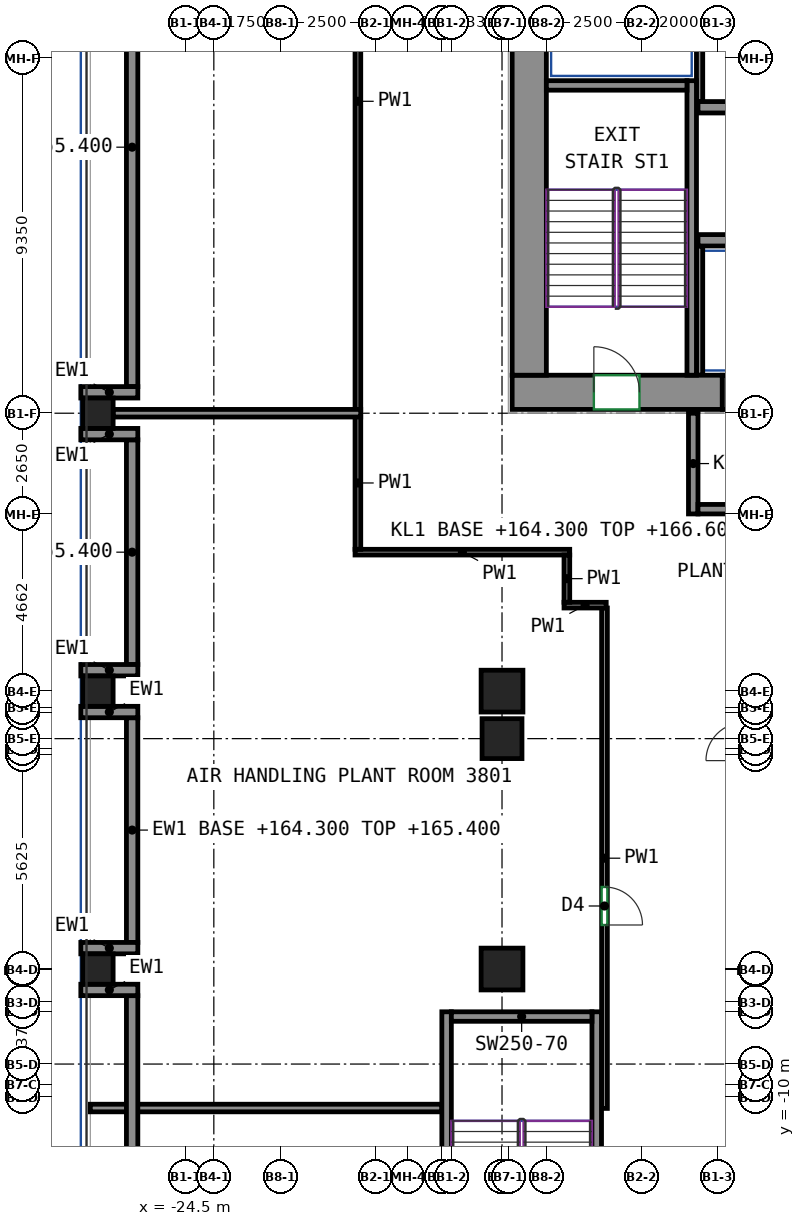
"""IFC4 building model, lengths in metres.
Left out: names, types, materials, properties, quantities, classifications, styles, units other than length and angle.
Written with IfcOpenShell. Run it as: python <this file> out.ifc"""

import sys

from ifc_helpers import new_model, si_unit, direction, frame, frame_2d, origin, origin_2d, place, context, subcontext, project, spatial, rectangle, extrude, source, transform, mapped, element, fill, save


model = new_model("IFC4")
c1 = context("Model", 3, precision=1e-05, world=origin(), true_north=direction((0.0, 1.0)))
c2 = subcontext(c1, "Body", "Model", "MODEL_VIEW")
j1 = project(units=[si_unit("LENGTHUNIT", "METRE"), si_unit("PLANEANGLEUNIT", "RADIAN")], contexts=[c1])
p1 = place(None, origin())
s1 = spatial("IfcSite", under=j1, at=p1, CompositionType="ELEMENT")
p2 = place(p1, origin())
s2 = spatial("IfcBuilding", under=s1, at=p2, CompositionType="ELEMENT")
p3 = place(p2, frame((0.0, 0.0, 164.3)))
s3 = spatial("IfcBuildingStorey", under=s2, at=p3, CompositionType="ELEMENT", Elevation=164.3)
m1 = source(origin(), c2, "Body", "SweptSolid", [
    extrude(rectangle(XDim=0.8, YDim=0.8, at=origin_2d()), origin(), (0.0, 0.0, 1.0), 2.3),
])
for number, where, z_axis, x_axis in (
    (1, (-26.8, -6.625, 0.0), (0.0, 0.0, 1.0), (1.0, 0.0, 0.0)),
    (2, (-26.8, 0.688, 0.0), (0.0, 0.0, 1.0), (1.0, 0.0, 0.0)),
    (3, (-26.8, 8.0, 0.0), (0.0, 0.0, 1.0), (1.0, 0.0, 0.0)),
):
    element("IfcColumn", number, at=place(p3, frame(where, z_axis=z_axis, x_axis=x_axis)), inside=s3, PredefinedType="COLUMN", context=c2, shape_type="MappedRepresentation", body=[
        mapped(m1, transform((0.0, 0.0, 0.0))),
    ])
m2 = source(origin(), c2, "Body", "SweptSolid", [
    extrude(rectangle(XDim=1.1, YDim=1.1, at=origin_2d()), origin(), (0.0, 0.0, 1.0), 2.3),
])
for number, where, z_axis, x_axis in (
    (4, (-16.167, -6.625, 0.0), (0.0, 0.0, 1.0), (1.0, 0.0, 0.0)),
    (5, (-16.167, 0.688, 0.0), (0.0, 0.0, 1.0), (1.0, 0.0, 0.0)),
):
    element("IfcColumn", number, at=place(p3, frame(where, z_axis=z_axis, x_axis=x_axis)), inside=s3, PredefinedType="COLUMN", context=c2, shape_type="MappedRepresentation", body=[
        mapped(m2, transform((0.0, 0.0, 0.0))),
    ])
m3 = source(origin(), c2, "Body", "SweptSolid", [
    extrude(rectangle(XDim=1.05, YDim=1.05, at=origin_2d()), origin(), (0.0, 0.0, 1.0), 3.8),
])
p4 = place(p3, frame((-16.167, -0.562, 0.0), z_axis=(0.0, 0.0, 1.0), x_axis=(1.0, 0.0, 0.0)))
e6 = element("IfcColumn", 6, at=p4, inside=s3, PredefinedType="COLUMN", context=c2, shape_type="MappedRepresentation", body=[
    mapped(m3, transform((0.0, 0.0, 0.0))),
])
m4 = source(origin(), c2, "Body", "SweptSolid", [
    extrude(rectangle(XDim=5.53, YDim=0.9, at=frame_2d((2.765, 0.0))), origin(), (0.0, 0.0, 1.0), 3.8),
])
p5 = place(p3, frame((-15.9, 8.55, 0.0), z_axis=(0.0, 0.0, 1.0), x_axis=(1.0, 0.0, 0.0)))
e7 = element("IfcWall", 7, at=p5, inside=s3, PredefinedType="SHEAR", context=c2, shape_type="MappedRepresentation", body=[
    mapped(m4, transform((0.0, 0.0, 0.0))),
])
p6 = place(p5, frame((2.15, 0.0, 0.0)))
e8 = element("IfcOpeningElement", 8, at=p6, cuts=e7, PredefinedType="OPENING", context=c2, shape_type="SweptSolid", body=[
    extrude(rectangle(XDim=1.2, YDim=2.1, at=frame_2d((0.6, 1.05))), frame((0.0, 0.46, 0.0), z_axis=(0.0, -1.0, 0.0), x_axis=(1.0, 0.0, 0.0)), (0.0, 0.0, 1.0), 0.92),
])
m5 = source(origin(), c2, "Body", "SweptSolid", [
    extrude(rectangle(XDim=12.0, YDim=0.9, at=frame_2d((6.0, 0.0))), origin(), (0.0, 0.0, 1.0), 3.8),
])
p7 = place(p3, frame((-15.45, 9.0, 0.0), z_axis=(0.0, 0.0, 1.0), x_axis=(0.0, 1.0, 0.0)))
e9 = element("IfcWall", 9, at=p7, inside=s3, PredefinedType="SHEAR", context=c2, shape_type="MappedRepresentation", body=[
    mapped(m5, transform((0.0, 0.0, 0.0))),
])
m6 = source(origin(), c2, "Body", "SweptSolid", [
    extrude(rectangle(XDim=7.75, YDim=0.25, at=frame_2d((3.875, 0.0))), origin(), (0.0, 0.0, 1.0), 3.8),
])
p8 = place(p3, frame((-11.175, 9.0, 0.0), z_axis=(0.0, 0.0, 1.0), x_axis=(0.0, 1.0, 0.0)))
e10 = element("IfcWall", 10, at=p8, inside=s3, PredefinedType="SHEAR", context=c2, shape_type="MappedRepresentation", body=[
    mapped(m6, transform((0.0, 0.0, 0.0))),
])
m7 = source(origin(), c2, "Body", "SweptSolid", [
    extrude(rectangle(XDim=3.7, YDim=0.25, at=frame_2d((1.85, 0.0))), origin(), (0.0, 0.0, 1.0), 3.8),
])
p9 = place(p3, frame((-15.0, 16.625, 0.0), z_axis=(0.0, 0.0, 1.0), x_axis=(1.0, 0.0, 0.0)))
e11 = element("IfcWall", 11, at=p9, inside=s3, PredefinedType="SHEAR", context=c2, shape_type="MappedRepresentation", body=[
    mapped(m7, transform((0.0, 0.0, 0.0))),
])
m8 = source(origin(), c2, "Body", "SweptSolid", [
    extrude(rectangle(XDim=8.0, YDim=0.25, at=frame_2d((4.0, 0.0))), origin(), (0.0, 0.0, 1.0), 3.8),
])
for number, where, z_axis, x_axis in (
    (12, (-17.625, -15.75, 0.0), (0.0, 0.0, 1.0), (0.0, 1.0, 0.0)),
    (13, (-13.675, -15.75, 0.0), (0.0, 0.0, 1.0), (0.0, 1.0, 0.0)),
):
    element("IfcWall", number, at=place(p3, frame(where, z_axis=z_axis, x_axis=x_axis)), inside=s3, PredefinedType="SHEAR", context=c2, shape_type="MappedRepresentation", body=[
        mapped(m8, transform((0.0, 0.0, 0.0))),
    ])
p10 = place(p3, frame((-17.5, -7.875, 0.0), z_axis=(0.0, 0.0, 1.0), x_axis=(1.0, 0.0, 0.0)))
e14 = element("IfcWall", 14, at=p10, inside=s3, PredefinedType="SHEAR", context=c2, shape_type="MappedRepresentation", body=[
    mapped(m7, transform((0.0, 0.0, 0.0))),
])
m9 = source(origin(), c2, "Body", "SweptSolid", [
    extrude(rectangle(XDim=6.0, YDim=0.3, at=frame_2d((3.0, 0.0))), origin(), (0.0, 0.0, 1.0), 3.8),
])
p11 = place(p3, frame((-11.01, 12.55, 0.0), z_axis=(0.0, 0.0, 1.0), x_axis=(1.0, 0.0, 0.0)))
e15 = element("IfcWall", 15, at=p11, inside=s3, PredefinedType="SHEAR", context=c2, shape_type="MappedRepresentation", body=[
    mapped(m9, transform((0.0, 0.0, 0.0))),
])
m10 = source(origin(), c2, "Body", "SweptSolid", [
    extrude(rectangle(XDim=14.04, YDim=0.3, at=frame_2d((7.02, 0.0))), origin(), (0.0, 0.0, 1.0), 3.8),
])
p12 = place(p3, frame((-11.01, 16.05, 0.0), z_axis=(0.0, 0.0, 1.0), x_axis=(1.0, 0.0, 0.0)))
e16 = element("IfcWall", 16, at=p12, inside=s3, PredefinedType="SHEAR", context=c2, shape_type="MappedRepresentation", body=[
    mapped(m10, transform((0.0, 0.0, 0.0))),
])
m11 = source(origin(), c2, "Body", "SweptSolid", [
    extrude(rectangle(XDim=12.6, YDim=0.3, at=frame_2d((6.3, 0.0))), origin(), (0.0, 0.0, 1.0), 1.1),
])
p13 = place(p3, frame((-25.9, 21.3, 0.0), z_axis=(0.0, 0.0, 1.0), x_axis=(0.0, -1.0, 0.0)))
e17 = element("IfcWall", 17, at=p13, inside=s3, PredefinedType="SOLIDWALL", context=c2, shape_type="MappedRepresentation", body=[
    mapped(m11, transform((0.0, 0.0, 0.0))),
])
m12 = source(origin(), c2, "Body", "SweptSolid", [
    extrude(rectangle(XDim=1.5, YDim=0.3, at=frame_2d((0.75, 0.0))), origin(), (0.0, 0.0, 1.0), 2.3),
])
p14 = place(p3, frame((-27.25, 8.55, 0.0), z_axis=(0.0, 0.0, 1.0), x_axis=(1.0, 0.0, 0.0)))
e18 = element("IfcWall", 18, at=p14, inside=s3, PredefinedType="SOLIDWALL", context=c2, shape_type="MappedRepresentation", body=[
    mapped(m12, transform((0.0, 0.0, 0.0))),
])
m13 = source(origin(), c2, "Body", "SweptSolid", [
    extrude(rectangle(XDim=5.913, YDim=0.3, at=frame_2d((2.956, 0.0))), origin(), (0.0, 0.0, 1.0), 1.1),
])
p15 = place(p3, frame((-25.9, 7.3, 0.0), z_axis=(0.0, 0.0, 1.0), x_axis=(0.0, -1.0, 0.0)))
e19 = element("IfcWall", 19, at=p15, inside=s3, PredefinedType="SOLIDWALL", context=c2, shape_type="MappedRepresentation", body=[
    mapped(m13, transform((0.0, 0.0, 0.0))),
])
for number, where, z_axis, x_axis in (
    (20, (-27.25, 7.45, 0.0), (0.0, 0.0, 1.0), (1.0, 0.0, 0.0)),
    (21, (-27.25, 1.238, 0.0), (0.0, 0.0, 1.0), (1.0, 0.0, 0.0)),
):
    element("IfcWall", number, at=place(p3, frame(where, z_axis=z_axis, x_axis=x_axis)), inside=s3, PredefinedType="SOLIDWALL", context=c2, shape_type="MappedRepresentation", body=[
        mapped(m12, transform((0.0, 0.0, 0.0))),
    ])
p16 = place(p3, frame((-25.9, -0.012, 0.0), z_axis=(0.0, 0.0, 1.0), x_axis=(0.0, -1.0, 0.0)))
e22 = element("IfcWall", 22, at=p16, inside=s3, PredefinedType="SOLIDWALL", context=c2, shape_type="MappedRepresentation", body=[
    mapped(m13, transform((0.0, 0.0, 0.0))),
])
for number, where, z_axis, x_axis in (
    (23, (-27.25, 0.137, 0.0), (0.0, 0.0, 1.0), (1.0, 0.0, 0.0)),
    (24, (-27.25, -6.075, 0.0), (0.0, 0.0, 1.0), (1.0, 0.0, 0.0)),
):
    element("IfcWall", number, at=place(p3, frame(where, z_axis=z_axis, x_axis=x_axis)), inside=s3, PredefinedType="SOLIDWALL", context=c2, shape_type="MappedRepresentation", body=[
        mapped(m12, transform((0.0, 0.0, 0.0))),
    ])
m14 = source(origin(), c2, "Body", "SweptSolid", [
    extrude(rectangle(XDim=9.725, YDim=0.3, at=frame_2d((4.863, 0.0))), origin(), (0.0, 0.0, 1.0), 1.1),
])
p17 = place(p3, frame((-25.9, -7.325, 0.0), z_axis=(0.0, 0.0, 1.0), x_axis=(0.0, -1.0, 0.0)))
e25 = element("IfcWall", 25, at=p17, inside=s3, PredefinedType="SOLIDWALL", context=c2, shape_type="MappedRepresentation", body=[
    mapped(m14, transform((0.0, 0.0, 0.0))),
])
p18 = place(p3, frame((-27.25, -7.175, 0.0), z_axis=(0.0, 0.0, 1.0), x_axis=(1.0, 0.0, 0.0)))
e26 = element("IfcWall", 26, at=p18, inside=s3, PredefinedType="SOLIDWALL", context=c2, shape_type="MappedRepresentation", body=[
    mapped(m12, transform((0.0, 0.0, 0.0))),
])
m15 = source(origin(), c2, "Body", "SweptSolid", [
    extrude(rectangle(XDim=2.65, YDim=0.25, at=frame_2d((1.325, 0.0))), origin(), (0.0, 0.0, 1.0), 3.8),
])
p19 = place(p3, frame((-11.135, 5.35, 0.0), z_axis=(0.0, 0.0, 1.0), x_axis=(0.0, 1.0, 0.0)))
e27 = element("IfcWall", 27, at=p19, inside=s3, PredefinedType="PARTITIONING", context=c2, shape_type="MappedRepresentation", body=[
    mapped(m15, transform((0.0, 0.0, 0.0))),
])
m16 = source(origin(), c2, "Body", "SweptSolid", [
    extrude(rectangle(XDim=5.36, YDim=0.25, at=frame_2d((2.68, 0.0))), origin(), (0.0, 0.0, 1.0), 2.3),
])
p20 = place(p3, frame((-11.01, 5.475, 0.0), z_axis=(0.0, 0.0, 1.0), x_axis=(1.0, 0.0, 0.0)))
e28 = element("IfcWall", 28, at=p20, inside=s3, PredefinedType="PARTITIONING", context=c2, shape_type="MappedRepresentation", body=[
    mapped(m16, transform((0.0, 0.0, 0.0))),
])
p21 = place(p20, frame((2.28, 0.0, 0.0)))
e29 = element("IfcOpeningElement", 29, at=p21, cuts=e28, PredefinedType="OPENING", context=c2, shape_type="SweptSolid", body=[
    extrude(rectangle(XDim=0.8, YDim=2.0, at=frame_2d((0.4, 1.0))), frame((0.0, 0.135, 0.0), z_axis=(0.0, -1.0, 0.0), x_axis=(1.0, 0.0, 0.0)), (0.0, 0.0, 1.0), 0.27),
])
m17 = source(origin(), c2, "Body", "SweptSolid", [
    extrude(rectangle(XDim=4.8, YDim=0.165, at=frame_2d((2.4, 0.0))), origin(), (0.0, 0.0, 1.0), 3.8),
])
p22 = place(p3, frame((-10.968, 16.2, 0.0), z_axis=(0.0, 0.0, 1.0), x_axis=(0.0, 1.0, 0.0)))
e30 = element("IfcWall", 30, at=p22, inside=s3, PredefinedType="PARTITIONING", context=c2, shape_type="MappedRepresentation", body=[
    mapped(m17, transform((0.0, 0.0, 0.0))),
])
m18 = source(origin(), c2, "Body", "SweptSolid", [
    extrude(rectangle(XDim=3.4, YDim=0.165, at=frame_2d((1.7, 0.0))), origin(), (0.0, 0.0, 1.0), 3.8),
])
p23 = place(p3, frame((-10.968, 9.0, 0.0), z_axis=(0.0, 0.0, 1.0), x_axis=(0.0, 1.0, 0.0)))
e31 = element("IfcWall", 31, at=p23, inside=s3, PredefinedType="PARTITIONING", context=c2, shape_type="MappedRepresentation", body=[
    mapped(m18, transform((0.0, 0.0, 0.0))),
])
m19 = source(origin(), c2, "Body", "SweptSolid", [
    extrude(rectangle(XDim=1.4, YDim=0.9, at=frame_2d((0.7, 0.0))), origin(), (0.0, 0.0, 1.0), 2.7),
])
p24 = place(p3, frame((-10.37, 8.55, 0.0), z_axis=(0.0, 0.0, 1.0), x_axis=(1.0, 0.0, 0.0)))
e32 = element("IfcWall", 32, at=p24, inside=s3, PredefinedType="PARTITIONING", context=c2, shape_type="MappedRepresentation", body=[
    mapped(m19, transform((0.0, 0.0, 0.0))),
])
p25 = place(p24, frame((0.25, 0.0, 0.0)))
e33 = element("IfcOpeningElement", 33, at=p25, cuts=e32, PredefinedType="OPENING", context=c2, shape_type="SweptSolid", body=[
    extrude(rectangle(XDim=0.9, YDim=2.1, at=frame_2d((0.45, 1.05))), frame((0.0, 0.46, 0.0), z_axis=(0.0, -1.0, 0.0), x_axis=(1.0, 0.0, 0.0)), (0.0, 0.0, 1.0), 0.92),
])
p26 = place(p3, frame((-20.034, 4.344, 0.0), z_axis=(0.0, 0.0, 1.0), x_axis=(1.0, 0.0, 0.0)))
e34 = element("IfcWall", 34, at=p26, inside=s3, PredefinedType="PARTITIONING", context=c2, shape_type="SweptSolid", body=[
    extrude(rectangle(XDim=5.649, YDim=0.15, at=frame_2d((2.824, 0.0))), origin(), (0.0, 0.0, 1.0), 3.8),
])
p27 = place(p3, frame((-19.959, 4.419, 0.0), z_axis=(0.0, 0.0, 1.0), x_axis=(0.0, 1.0, 0.0)))
e35 = element("IfcWall", 35, at=p27, inside=s3, PredefinedType="PARTITIONING", context=c2, shape_type="SweptSolid", body=[
    extrude(rectangle(XDim=3.491, YDim=0.15, at=frame_2d((1.746, 0.0))), origin(), (0.0, 0.0, 1.0), 3.8),
])
p28 = place(p3, frame((-13.47, 2.875, 0.0), z_axis=(0.0, 0.0, 1.0), x_axis=(0.0, -1.0, 0.0)))
e36 = element("IfcWall", 36, at=p28, inside=s3, PredefinedType="PARTITIONING", context=c2, shape_type="SweptSolid", body=[
    extrude(rectangle(XDim=13.167, YDim=0.15, at=frame_2d((6.583, 0.0))), origin(), (0.0, 0.0, 1.0), 3.8),
])
p29 = place(p28, frame((7.341, 0.0, 0.0)))
e37 = element("IfcOpeningElement", 37, at=p29, cuts=e36, PredefinedType="OPENING", context=c2, shape_type="SweptSolid", body=[
    extrude(rectangle(XDim=1.0, YDim=2.1, at=frame_2d((0.5, 1.05))), frame((0.0, 0.085, 0.0), z_axis=(0.0, -1.0, 0.0), x_axis=(1.0, 0.0, 0.0)), (0.0, 0.0, 1.0), 0.17),
])
p30 = place(p3, frame((-14.535, 2.95, 0.0), z_axis=(0.0, 0.0, 1.0), x_axis=(1.0, 0.0, 0.0)))
e38 = element("IfcWall", 38, at=p30, inside=s3, PredefinedType="PARTITIONING", context=c2, shape_type="SweptSolid", body=[
    extrude(rectangle(XDim=1.11, YDim=0.15, at=frame_2d((0.555, 0.0))), origin(), (0.0, 0.0, 1.0), 3.8),
])
p31 = place(p3, frame((-14.46, 4.269, 0.0), z_axis=(0.0, 0.0, 1.0), x_axis=(0.0, -1.0, 0.0)))
e39 = element("IfcWall", 39, at=p31, inside=s3, PredefinedType="PARTITIONING", context=c2, shape_type="SweptSolid", body=[
    extrude(rectangle(XDim=1.244, YDim=0.15, at=frame_2d((0.622, 0.0))), origin(), (0.0, 0.0, 1.0), 3.8),
])
p32 = place(p3, frame((-19.959, 8.09, 0.0), z_axis=(0.0, 0.0, 1.0), x_axis=(0.0, 1.0, 0.0)))
e40 = element("IfcWall", 40, at=p32, inside=s3, PredefinedType="PARTITIONING", context=c2, shape_type="SweptSolid", body=[
    extrude(rectangle(XDim=16.235, YDim=0.15, at=frame_2d((8.117, 0.0))), origin(), (0.0, 0.0, 1.0), 3.8),
])
p33 = place(p3, frame((-27.0, -10.282, 0.0), z_axis=(0.0, 0.0, 1.0), x_axis=(1.0, 0.0, 0.0)))
e41 = element("IfcWall", 41, at=p33, inside=s3, PredefinedType="PARTITIONING", context=c2, shape_type="SweptSolid", body=[
    extrude(rectangle(XDim=0.98, YDim=0.2, at=frame_2d((0.49, 0.0))), origin(), (0.0, 0.0, 1.0), 3.8),
])
p34 = place(p3, frame((-25.78, -10.282, 0.0), z_axis=(0.0, 0.0, 1.0), x_axis=(1.0, 0.0, 0.0)))
e42 = element("IfcWall", 42, at=p34, inside=s3, PredefinedType="PARTITIONING", context=c2, shape_type="SweptSolid", body=[
    extrude(rectangle(XDim=8.03, YDim=0.2, at=frame_2d((4.015, 0.0))), origin(), (0.0, 0.0, 1.0), 3.8),
])
p35 = place(p3, frame((-19.885, 8.0, 0.0), z_axis=(0.0, 0.0, 1.0), x_axis=(-1.0, 0.0, 0.0)))
e43 = element("IfcWall", 43, at=p35, inside=s3, PredefinedType="PARTITIONING", context=c2, shape_type="SweptSolid", body=[
    extrude(rectangle(XDim=6.515, YDim=0.2, at=frame_2d((3.257, 0.0))), origin(), (0.0, 0.0, 1.0), 3.8),
])
p36 = place(p6, origin())
e44 = element("IfcDoor", 44, at=p36, inside=s3, OperationType="DOUBLE_DOOR_SINGLE_SWING", PredefinedType="DOOR", context=c2, shape_type="SweptSolid", body=[
    extrude(rectangle(XDim=1.2, YDim=2.1, at=frame_2d((0.6, 1.05))), frame((0.0, 0.355, 0.0), z_axis=(0.0, -1.0, 0.0), x_axis=(1.0, 0.0, 0.0)), (0.0, 0.0, 1.0), 0.05),
])
fill(e8, e44)
p37 = place(p29, origin())
e45 = element("IfcDoor", 45, at=p37, inside=s3, OperationType="SINGLE_SWING_RIGHT", PredefinedType="DOOR", context=c2, shape_type="SweptSolid", body=[
    extrude(rectangle(XDim=1.0, YDim=2.1, at=frame_2d((0.5, 1.05))), frame((0.0, 0.025, 0.0), z_axis=(0.0, -1.0, 0.0), x_axis=(1.0, 0.0, 0.0)), (0.0, 0.0, 1.0), 0.05),
])
fill(e37, e45)
save(model, sys.argv[1])
